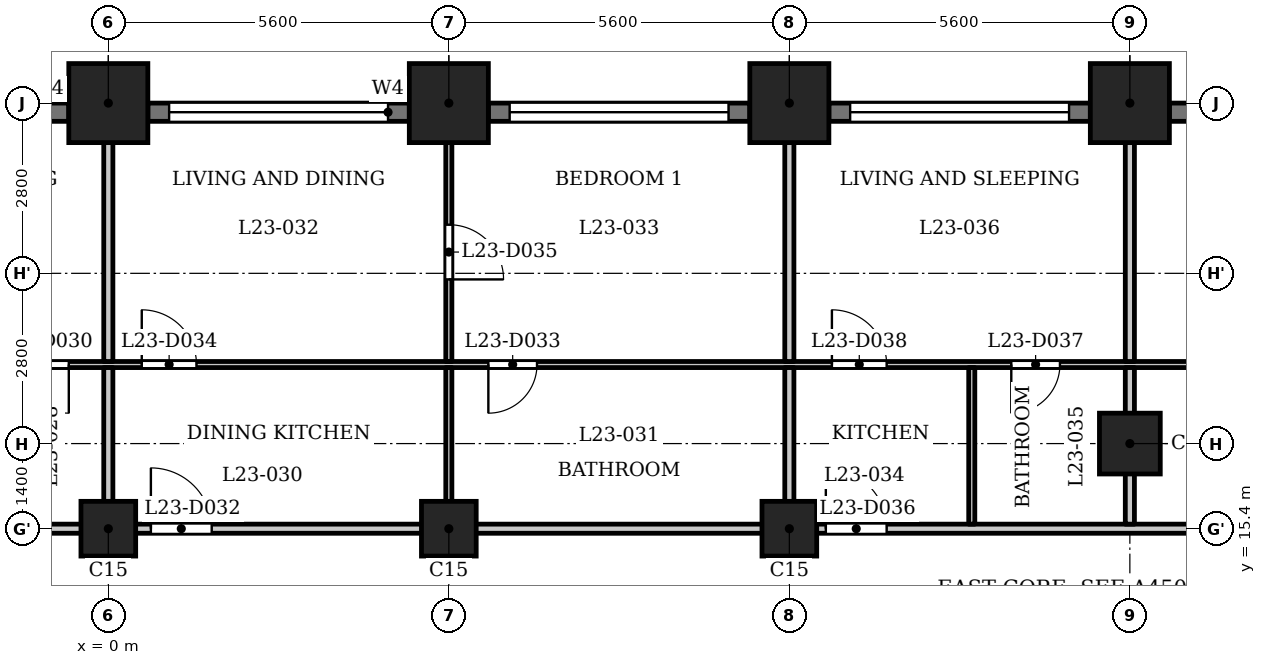
"""IFC4 building model, lengths in metres.
Left out: names, types, materials, properties, quantities, classifications, styles, units other than length and angle.
Written with IfcOpenShell. Run it as: python <this file> out.ifc"""

import sys

from ifc_helpers import new_model, si_unit, direction, frame, frame_2d, origin, origin_2d, place, context, subcontext, project, spatial, rectangle, extrude, element, fill, save


model = new_model("IFC4")
c1 = context("Model", 3, precision=1e-05, world=origin(), true_north=direction((0.0, 1.0)))
c2 = subcontext(c1, "Body", "Model", "MODEL_VIEW")
j1 = project(units=[si_unit("LENGTHUNIT", "METRE"), si_unit("PLANEANGLEUNIT", "RADIAN")], contexts=[c1])
p1 = place(None, origin())
s1 = spatial("IfcSite", under=j1, at=p1, CompositionType="ELEMENT")
p2 = place(p1, origin())
s2 = spatial("IfcBuilding", under=s1, at=p2, CompositionType="ELEMENT")
p3 = place(p2, frame((0.0, 0.0, 93.8)))
s3 = spatial("IfcBuildingStorey", under=s2, at=p3, CompositionType="ELEMENT", Elevation=93.8)
for number, where, z_axis, x_axis in (
    (1, (16.8, 22.4, 0.0), (0.0, 0.0, 1.0), (1.0, 0.0, 0.0)),
    (2, (11.2, 22.4, 0.0), (0.0, 0.0, 1.0), (1.0, 0.0, 0.0)),
    (3, (5.6, 22.4, 0.0), (0.0, 0.0, 1.0), (1.0, 0.0, 0.0)),
    (4, (0.0, 22.4, 0.0), (0.0, 0.0, 1.0), (1.0, 0.0, 0.0)),
):
    element("IfcColumn", number, at=place(p3, frame(where, z_axis=z_axis, x_axis=x_axis)), inside=s3, PredefinedType="COLUMN", context=c2, shape_type="SweptSolid", body=[
        extrude(rectangle(XDim=1.3, YDim=1.3, at=origin_2d()), origin(), (0.0, 0.0, 1.0), 3.5),
    ])
p4 = place(p3, frame((16.8, 16.8, 0.0), z_axis=(0.0, 0.0, 1.0), x_axis=(1.0, 0.0, 0.0)))
e5 = element("IfcColumn", 5, at=p4, inside=s3, PredefinedType="COLUMN", context=c2, shape_type="SweptSolid", body=[
    extrude(rectangle(XDim=1.0, YDim=1.0, at=origin_2d()), origin(), (0.0, 0.0, 1.0), 3.5),
])
for number, where, z_axis, x_axis in (
    (6, (0.0, 15.4, 0.0), (0.0, 0.0, 1.0), (1.0, 0.0, 0.0)),
    (7, (5.6, 15.4, 0.0), (0.0, 0.0, 1.0), (1.0, 0.0, 0.0)),
    (8, (11.2, 15.4, 0.0), (0.0, 0.0, 1.0), (1.0, 0.0, 0.0)),
):
    element("IfcColumn", number, at=place(p3, frame(where, z_axis=z_axis, x_axis=x_axis)), inside=s3, PredefinedType="COLUMN", context=c2, shape_type="SweptSolid", body=[
        extrude(rectangle(XDim=0.9, YDim=0.9, at=origin_2d()), origin(), (0.0, 0.0, 1.0), 3.5),
    ])
p5 = place(p3, frame((20.0, 22.25, 0.0), z_axis=(0.0, 0.0, 1.0), x_axis=(-1.0, 0.0, 0.0)))
e9 = element("IfcWall", 9, at=p5, inside=s3, PredefinedType="SOLIDWALL", context=c2, shape_type="SweptSolid", body=[
    extrude(rectangle(XDim=2.55, YDim=0.3, at=frame_2d((1.275, 0.0))), origin(), (0.0, 0.0, 1.0), 2.4),
])
p6 = place(p5, frame((0.675, 0.0, 0.6)))
e10 = element("IfcOpeningElement", 10, at=p6, cuts=e9, PredefinedType="OPENING", context=c2, shape_type="SweptSolid", body=[
    extrude(rectangle(XDim=1.2, YDim=1.55, at=frame_2d((0.6, 0.775))), frame((0.0, 0.16, 0.0), z_axis=(0.0, -1.0, 0.0), x_axis=(1.0, 0.0, 0.0)), (0.0, 0.0, 1.0), 0.32),
])
p7 = place(p3, frame((16.15, 22.25, 0.0), z_axis=(0.0, 0.0, 1.0), x_axis=(-1.0, 0.0, 0.0)))
e11 = element("IfcWall", 11, at=p7, inside=s3, PredefinedType="SOLIDWALL", context=c2, shape_type="SweptSolid", body=[
    extrude(rectangle(XDim=4.3, YDim=0.3, at=frame_2d((2.15, 0.0))), origin(), (0.0, 0.0, 1.0), 2.4),
])
p8 = place(p7, frame((0.35, 0.0, 1.2)))
e12 = element("IfcOpeningElement", 12, at=p8, cuts=e11, PredefinedType="OPENING", context=c2, shape_type="SweptSolid", body=[
    extrude(rectangle(XDim=3.6, YDim=0.95, at=frame_2d((1.8, 0.475))), frame((0.0, 0.16, 0.0), z_axis=(0.0, -1.0, 0.0), x_axis=(1.0, 0.0, 0.0)), (0.0, 0.0, 1.0), 0.32),
])
p9 = place(p3, frame((10.55, 22.25, 0.0), z_axis=(0.0, 0.0, 1.0), x_axis=(-1.0, 0.0, 0.0)))
e13 = element("IfcWall", 13, at=p9, inside=s3, PredefinedType="SOLIDWALL", context=c2, shape_type="SweptSolid", body=[
    extrude(rectangle(XDim=4.3, YDim=0.3, at=frame_2d((2.15, 0.0))), origin(), (0.0, 0.0, 1.0), 2.4),
])
p10 = place(p9, frame((0.35, 0.0, 1.2)))
e14 = element("IfcOpeningElement", 14, at=p10, cuts=e13, PredefinedType="OPENING", context=c2, shape_type="SweptSolid", body=[
    extrude(rectangle(XDim=3.6, YDim=0.95, at=frame_2d((1.8, 0.475))), frame((0.0, 0.16, 0.0), z_axis=(0.0, -1.0, 0.0), x_axis=(1.0, 0.0, 0.0)), (0.0, 0.0, 1.0), 0.32),
])
p11 = place(p3, frame((4.95, 22.25, 0.0), z_axis=(0.0, 0.0, 1.0), x_axis=(-1.0, 0.0, 0.0)))
e15 = element("IfcWall", 15, at=p11, inside=s3, PredefinedType="SOLIDWALL", context=c2, shape_type="SweptSolid", body=[
    extrude(rectangle(XDim=4.3, YDim=0.3, at=frame_2d((2.15, 0.0))), origin(), (0.0, 0.0, 1.0), 2.4),
])
p12 = place(p11, frame((0.35, 0.0, 1.2)))
e16 = element("IfcOpeningElement", 16, at=p12, cuts=e15, PredefinedType="OPENING", context=c2, shape_type="SweptSolid", body=[
    extrude(rectangle(XDim=3.6, YDim=0.95, at=frame_2d((1.8, 0.475))), frame((0.0, 0.16, 0.0), z_axis=(0.0, -1.0, 0.0), x_axis=(1.0, 0.0, 0.0)), (0.0, 0.0, 1.0), 0.32),
])
p13 = place(p3, frame((-0.65, 22.25, 0.0), z_axis=(0.0, 0.0, 1.0), x_axis=(-1.0, 0.0, 0.0)))
e17 = element("IfcWall", 17, at=p13, inside=s3, PredefinedType="SOLIDWALL", context=c2, shape_type="SweptSolid", body=[
    extrude(rectangle(XDim=4.3, YDim=0.3, at=frame_2d((2.15, 0.0))), origin(), (0.0, 0.0, 1.0), 2.4),
])
p14 = place(p13, frame((0.35, 0.0, 1.2)))
e18 = element("IfcOpeningElement", 18, at=p14, cuts=e17, PredefinedType="OPENING", context=c2, shape_type="SweptSolid", body=[
    extrude(rectangle(XDim=3.6, YDim=0.95, at=frame_2d((1.8, 0.475))), frame((0.0, 0.16, 0.0), z_axis=(0.0, -1.0, 0.0), x_axis=(1.0, 0.0, 0.0)), (0.0, 0.0, 1.0), 0.32),
])
p15 = place(p3, frame((-27.484, 15.4, 0.0), z_axis=(0.0, 0.0, 1.0), x_axis=(1.0, 0.0, 0.0)))
e19 = element("IfcWall", 19, at=p15, inside=s3, PredefinedType="PARTITIONING", context=c2, shape_type="SweptSolid", body=[
    extrude(rectangle(XDim=54.968, YDim=0.15, at=frame_2d((27.484, 0.0))), origin(), (0.0, 0.0, 1.0), 3.2),
])
p16 = place(p15, frame((9.034, 0.0, 0.0)))
e20 = element("IfcOpeningElement", 20, at=p16, cuts=e19, PredefinedType="OPENING", context=c2, shape_type="SweptSolid", body=[
    extrude(rectangle(XDim=1.0, YDim=2.1, at=frame_2d((0.5, 1.05))), frame((0.0, 0.085, 0.0), z_axis=(0.0, -1.0, 0.0), x_axis=(1.0, 0.0, 0.0)), (0.0, 0.0, 1.0), 0.17),
])
p17 = place(p15, frame((14.634, 0.0, 0.0)))
e21 = element("IfcOpeningElement", 21, at=p17, cuts=e19, PredefinedType="OPENING", context=c2, shape_type="SweptSolid", body=[
    extrude(rectangle(XDim=1.0, YDim=2.1, at=frame_2d((0.5, 1.05))), frame((0.0, 0.085, 0.0), z_axis=(0.0, -1.0, 0.0), x_axis=(1.0, 0.0, 0.0)), (0.0, 0.0, 1.0), 0.17),
])
p18 = place(p15, frame((19.984, 0.0, 0.0)))
e22 = element("IfcOpeningElement", 22, at=p18, cuts=e19, PredefinedType="OPENING", context=c2, shape_type="SweptSolid", body=[
    extrude(rectangle(XDim=1.0, YDim=2.1, at=frame_2d((0.5, 1.05))), frame((0.0, 0.085, 0.0), z_axis=(0.0, -1.0, 0.0), x_axis=(1.0, 0.0, 0.0)), (0.0, 0.0, 1.0), 0.17),
])
p19 = place(p15, frame((23.234, 0.0, 0.0)))
e23 = element("IfcOpeningElement", 23, at=p19, cuts=e19, PredefinedType="OPENING", context=c2, shape_type="SweptSolid", body=[
    extrude(rectangle(XDim=1.0, YDim=2.1, at=frame_2d((0.5, 1.05))), frame((0.0, 0.085, 0.0), z_axis=(0.0, -1.0, 0.0), x_axis=(1.0, 0.0, 0.0)), (0.0, 0.0, 1.0), 0.17),
])
p20 = place(p15, frame((28.184, 0.0, 0.0)))
e24 = element("IfcOpeningElement", 24, at=p20, cuts=e19, PredefinedType="OPENING", context=c2, shape_type="SweptSolid", body=[
    extrude(rectangle(XDim=1.0, YDim=2.1, at=frame_2d((0.5, 1.05))), frame((0.0, 0.085, 0.0), z_axis=(0.0, -1.0, 0.0), x_axis=(1.0, 0.0, 0.0)), (0.0, 0.0, 1.0), 0.17),
])
p21 = place(p15, frame((39.284, 0.0, 0.0)))
e25 = element("IfcOpeningElement", 25, at=p21, cuts=e19, PredefinedType="OPENING", context=c2, shape_type="SweptSolid", body=[
    extrude(rectangle(XDim=1.0, YDim=2.1, at=frame_2d((0.5, 1.05))), frame((0.0, 0.085, 0.0), z_axis=(0.0, -1.0, 0.0), x_axis=(1.0, 0.0, 0.0)), (0.0, 0.0, 1.0), 0.17),
])
p22 = place(p15, frame((48.234, 0.0, 0.0)))
e26 = element("IfcOpeningElement", 26, at=p22, cuts=e19, PredefinedType="OPENING", context=c2, shape_type="SweptSolid", body=[
    extrude(rectangle(XDim=1.0, YDim=2.1, at=frame_2d((0.5, 1.05))), frame((0.0, 0.085, 0.0), z_axis=(0.0, -1.0, 0.0), x_axis=(1.0, 0.0, 0.0)), (0.0, 0.0, 1.0), 0.17),
])
p23 = place(p3, frame((-26.44, 18.1, 0.0), z_axis=(0.0, 0.0, 1.0), x_axis=(1.0, 0.0, 0.0)))
e27 = element("IfcWall", 27, at=p23, inside=s3, PredefinedType="PARTITIONING", context=c2, shape_type="SweptSolid", body=[
    extrude(rectangle(XDim=52.63, YDim=0.1, at=frame_2d((26.315, 0.0))), origin(), (0.0, 0.0, 1.0), 3.2),
])
p24 = place(p23, frame((2.626, 0.0, 0.0)))
e28 = element("IfcOpeningElement", 28, at=p24, cuts=e27, PredefinedType="OPENING", context=c2, shape_type="SweptSolid", body=[
    extrude(rectangle(XDim=0.8, YDim=2.1, at=frame_2d((0.4, 1.05))), frame((0.0, 0.06, 0.0), z_axis=(0.0, -1.0, 0.0), x_axis=(1.0, 0.0, 0.0)), (0.0, 0.0, 1.0), 0.12),
])
p25 = place(p23, frame((8.09, 0.0, 0.0)))
e29 = element("IfcOpeningElement", 29, at=p25, cuts=e27, PredefinedType="OPENING", context=c2, shape_type="SweptSolid", body=[
    extrude(rectangle(XDim=0.9, YDim=2.1, at=frame_2d((0.45, 1.05))), frame((0.0, 0.06, 0.0), z_axis=(0.0, -1.0, 0.0), x_axis=(1.0, 0.0, 0.0)), (0.0, 0.0, 1.0), 0.12),
])
p26 = place(p23, frame((10.29, 0.0, 0.0)))
e30 = element("IfcOpeningElement", 30, at=p26, cuts=e27, PredefinedType="OPENING", context=c2, shape_type="SweptSolid", body=[
    extrude(rectangle(XDim=0.8, YDim=2.1, at=frame_2d((0.4, 1.05))), frame((0.0, 0.06, 0.0), z_axis=(0.0, -1.0, 0.0), x_axis=(1.0, 0.0, 0.0)), (0.0, 0.0, 1.0), 0.12),
])
p27 = place(p23, frame((13.69, 0.0, 0.0)))
e31 = element("IfcOpeningElement", 31, at=p27, cuts=e27, PredefinedType="OPENING", context=c2, shape_type="SweptSolid", body=[
    extrude(rectangle(XDim=0.9, YDim=2.1, at=frame_2d((0.45, 1.05))), frame((0.0, 0.06, 0.0), z_axis=(0.0, -1.0, 0.0), x_axis=(1.0, 0.0, 0.0)), (0.0, 0.0, 1.0), 0.12),
])
p28 = place(p23, frame((15.89, 0.0, 0.0)))
e32 = element("IfcOpeningElement", 32, at=p28, cuts=e27, PredefinedType="OPENING", context=c2, shape_type="SweptSolid", body=[
    extrude(rectangle(XDim=0.8, YDim=2.1, at=frame_2d((0.4, 1.05))), frame((0.0, 0.06, 0.0), z_axis=(0.0, -1.0, 0.0), x_axis=(1.0, 0.0, 0.0)), (0.0, 0.0, 1.0), 0.12),
])
p29 = place(p23, frame((19.04, 0.0, 0.0)))
e33 = element("IfcOpeningElement", 33, at=p29, cuts=e27, PredefinedType="OPENING", context=c2, shape_type="SweptSolid", body=[
    extrude(rectangle(XDim=0.9, YDim=2.1, at=frame_2d((0.45, 1.05))), frame((0.0, 0.06, 0.0), z_axis=(0.0, -1.0, 0.0), x_axis=(1.0, 0.0, 0.0)), (0.0, 0.0, 1.0), 0.12),
])
p30 = place(p23, frame((24.99, 0.0, 0.0)))
e34 = element("IfcOpeningElement", 34, at=p30, cuts=e27, PredefinedType="OPENING", context=c2, shape_type="SweptSolid", body=[
    extrude(rectangle(XDim=0.8, YDim=2.1, at=frame_2d((0.4, 1.05))), frame((0.0, 0.06, 0.0), z_axis=(0.0, -1.0, 0.0), x_axis=(1.0, 0.0, 0.0)), (0.0, 0.0, 1.0), 0.12),
])
p31 = place(p23, frame((22.29, 0.0, 0.0)))
e35 = element("IfcOpeningElement", 35, at=p31, cuts=e27, PredefinedType="OPENING", context=c2, shape_type="SweptSolid", body=[
    extrude(rectangle(XDim=0.9, YDim=2.1, at=frame_2d((0.45, 1.05))), frame((0.0, 0.06, 0.0), z_axis=(0.0, -1.0, 0.0), x_axis=(1.0, 0.0, 0.0)), (0.0, 0.0, 1.0), 0.12),
])
p32 = place(p23, frame((32.69, 0.0, 0.0)))
e36 = element("IfcOpeningElement", 36, at=p32, cuts=e27, PredefinedType="OPENING", context=c2, shape_type="SweptSolid", body=[
    extrude(rectangle(XDim=0.8, YDim=2.1, at=frame_2d((0.4, 1.05))), frame((0.0, 0.06, 0.0), z_axis=(0.0, -1.0, 0.0), x_axis=(1.0, 0.0, 0.0)), (0.0, 0.0, 1.0), 0.12),
])
p33 = place(p23, frame((26.99, 0.0, 0.0)))
e37 = element("IfcOpeningElement", 37, at=p33, cuts=e27, PredefinedType="OPENING", context=c2, shape_type="SweptSolid", body=[
    extrude(rectangle(XDim=0.9, YDim=2.1, at=frame_2d((0.45, 1.05))), frame((0.0, 0.06, 0.0), z_axis=(0.0, -1.0, 0.0), x_axis=(1.0, 0.0, 0.0)), (0.0, 0.0, 1.0), 0.12),
])
p34 = place(p23, frame((41.29, 0.0, 0.0)))
e38 = element("IfcOpeningElement", 38, at=p34, cuts=e27, PredefinedType="OPENING", context=c2, shape_type="SweptSolid", body=[
    extrude(rectangle(XDim=0.8, YDim=2.1, at=frame_2d((0.4, 1.05))), frame((0.0, 0.06, 0.0), z_axis=(0.0, -1.0, 0.0), x_axis=(1.0, 0.0, 0.0)), (0.0, 0.0, 1.0), 0.12),
])
p35 = place(p23, frame((38.34, 0.0, 0.0)))
e39 = element("IfcOpeningElement", 39, at=p35, cuts=e27, PredefinedType="OPENING", context=c2, shape_type="SweptSolid", body=[
    extrude(rectangle(XDim=0.9, YDim=2.1, at=frame_2d((0.45, 1.05))), frame((0.0, 0.06, 0.0), z_axis=(0.0, -1.0, 0.0), x_axis=(1.0, 0.0, 0.0)), (0.0, 0.0, 1.0), 0.12),
])
p36 = place(p23, frame((50.74, 0.0, 0.0)))
e40 = element("IfcOpeningElement", 40, at=p36, cuts=e27, PredefinedType="OPENING", context=c2, shape_type="SweptSolid", body=[
    extrude(rectangle(XDim=0.8, YDim=2.1, at=frame_2d((0.4, 1.05))), frame((0.0, 0.06, 0.0), z_axis=(0.0, -1.0, 0.0), x_axis=(1.0, 0.0, 0.0)), (0.0, 0.0, 1.0), 0.12),
])
p37 = place(p23, frame((47.29, 0.0, 0.0)))
e41 = element("IfcOpeningElement", 41, at=p37, cuts=e27, PredefinedType="OPENING", context=c2, shape_type="SweptSolid", body=[
    extrude(rectangle(XDim=0.9, YDim=2.1, at=frame_2d((0.45, 1.05))), frame((0.0, 0.06, 0.0), z_axis=(0.0, -1.0, 0.0), x_axis=(1.0, 0.0, 0.0)), (0.0, 0.0, 1.0), 0.12),
])
p38 = place(p3, frame((0.0, 15.475, 0.0), z_axis=(0.0, 0.0, 1.0), x_axis=(0.0, 1.0, 0.0)))
e42 = element("IfcWall", 42, at=p38, inside=s3, PredefinedType="PARTITIONING", context=c2, shape_type="SweptSolid", body=[
    extrude(rectangle(XDim=2.575, YDim=0.15, at=frame_2d((1.288, 0.0))), origin(), (0.0, 0.0, 1.0), 3.2),
])
p39 = place(p3, frame((0.0, 18.15, 0.0), z_axis=(0.0, 0.0, 1.0), x_axis=(0.0, 1.0, 0.0)))
e43 = element("IfcWall", 43, at=p39, inside=s3, PredefinedType="PARTITIONING", context=c2, shape_type="SweptSolid", body=[
    extrude(rectangle(XDim=4.88, YDim=0.15, at=frame_2d((2.44, 0.0))), origin(), (0.0, 0.0, 1.0), 3.2),
])
p40 = place(p3, frame((5.6, 15.475, 0.0), z_axis=(0.0, 0.0, 1.0), x_axis=(0.0, 1.0, 0.0)))
e44 = element("IfcWall", 44, at=p40, inside=s3, PredefinedType="PARTITIONING", context=c2, shape_type="SweptSolid", body=[
    extrude(rectangle(XDim=2.575, YDim=0.1, at=frame_2d((1.288, 0.0))), origin(), (0.0, 0.0, 1.0), 3.2),
])
p41 = place(p3, frame((5.6, 18.15, 0.0), z_axis=(0.0, 0.0, 1.0), x_axis=(0.0, 1.0, 0.0)))
e45 = element("IfcWall", 45, at=p41, inside=s3, PredefinedType="PARTITIONING", context=c2, shape_type="SweptSolid", body=[
    extrude(rectangle(XDim=4.88, YDim=0.1, at=frame_2d((2.44, 0.0))), origin(), (0.0, 0.0, 1.0), 3.2),
])
p42 = place(p41, frame((1.35, 0.0, 0.0)))
e46 = element("IfcOpeningElement", 46, at=p42, cuts=e45, PredefinedType="OPENING", context=c2, shape_type="SweptSolid", body=[
    extrude(rectangle(XDim=0.9, YDim=2.1, at=frame_2d((0.45, 1.05))), frame((0.0, 0.06, 0.0), z_axis=(0.0, -1.0, 0.0), x_axis=(1.0, 0.0, 0.0)), (0.0, 0.0, 1.0), 0.12),
])
p43 = place(p3, frame((11.2, 15.475, 0.0), z_axis=(0.0, 0.0, 1.0), x_axis=(0.0, 1.0, 0.0)))
e47 = element("IfcWall", 47, at=p43, inside=s3, PredefinedType="PARTITIONING", context=c2, shape_type="SweptSolid", body=[
    extrude(rectangle(XDim=2.575, YDim=0.15, at=frame_2d((1.288, 0.0))), origin(), (0.0, 0.0, 1.0), 3.2),
])
p44 = place(p3, frame((11.2, 18.15, 0.0), z_axis=(0.0, 0.0, 1.0), x_axis=(0.0, 1.0, 0.0)))
e48 = element("IfcWall", 48, at=p44, inside=s3, PredefinedType="PARTITIONING", context=c2, shape_type="SweptSolid", body=[
    extrude(rectangle(XDim=4.88, YDim=0.15, at=frame_2d((2.44, 0.0))), origin(), (0.0, 0.0, 1.0), 3.2),
])
p45 = place(p3, frame((14.2, 15.475, 0.0), z_axis=(0.0, 0.0, 1.0), x_axis=(0.0, 1.0, 0.0)))
e49 = element("IfcWall", 49, at=p45, inside=s3, PredefinedType="PARTITIONING", context=c2, shape_type="SweptSolid", body=[
    extrude(rectangle(XDim=2.575, YDim=0.1, at=frame_2d((1.288, 0.0))), origin(), (0.0, 0.0, 1.0), 3.2),
])
p46 = place(p3, frame((16.8, 15.475, 0.0), z_axis=(0.0, 0.0, 1.0), x_axis=(0.0, 1.0, 0.0)))
e50 = element("IfcWall", 50, at=p46, inside=s3, PredefinedType="PARTITIONING", context=c2, shape_type="SweptSolid", body=[
    extrude(rectangle(XDim=2.575, YDim=0.15, at=frame_2d((1.288, 0.0))), origin(), (0.0, 0.0, 1.0), 3.2),
])
p47 = place(p3, frame((16.8, 18.15, 0.0), z_axis=(0.0, 0.0, 1.0), x_axis=(0.0, 1.0, 0.0)))
e51 = element("IfcWall", 51, at=p47, inside=s3, PredefinedType="PARTITIONING", context=c2, shape_type="SweptSolid", body=[
    extrude(rectangle(XDim=4.88, YDim=0.15, at=frame_2d((2.44, 0.0))), origin(), (0.0, 0.0, 1.0), 3.2),
])
p48 = place(p30, origin())
e52 = element("IfcDoor", 52, at=p48, inside=s3, OperationType="SINGLE_SWING_RIGHT", PredefinedType="DOOR", context=c2, shape_type="SweptSolid", body=[
    extrude(rectangle(XDim=0.8, YDim=2.1, at=frame_2d((0.4, 1.05))), frame((0.0, 0.025, 0.0), z_axis=(0.0, -1.0, 0.0), x_axis=(1.0, 0.0, 0.0)), (0.0, 0.0, 1.0), 0.05),
])
fill(e34, e52)
p49 = place(p20, origin())
e53 = element("IfcDoor", 53, at=p49, inside=s3, OperationType="SINGLE_SWING_RIGHT", PredefinedType="DOOR", context=c2, shape_type="SweptSolid", body=[
    extrude(rectangle(XDim=1.0, YDim=2.1, at=frame_2d((0.5, 1.05))), frame((0.0, 0.025, 0.0), z_axis=(0.0, -1.0, 0.0), x_axis=(1.0, 0.0, 0.0)), (0.0, 0.0, 1.0), 0.05),
])
fill(e24, e53)
p50 = place(p32, origin())
e54 = element("IfcDoor", 54, at=p50, inside=s3, OperationType="SINGLE_SWING_LEFT", PredefinedType="DOOR", context=c2, shape_type="SweptSolid", body=[
    extrude(rectangle(XDim=0.8, YDim=2.1, at=frame_2d((0.4, 1.05))), frame((0.0, 0.025, 0.0), z_axis=(0.0, -1.0, 0.0), x_axis=(1.0, 0.0, 0.0)), (0.0, 0.0, 1.0), 0.05),
])
fill(e36, e54)
p51 = place(p33, origin())
e55 = element("IfcDoor", 55, at=p51, inside=s3, OperationType="SINGLE_SWING_RIGHT", PredefinedType="DOOR", context=c2, shape_type="SweptSolid", body=[
    extrude(rectangle(XDim=0.9, YDim=2.1, at=frame_2d((0.45, 1.05))), frame((0.0, 0.025, 0.0), z_axis=(0.0, -1.0, 0.0), x_axis=(1.0, 0.0, 0.0)), (0.0, 0.0, 1.0), 0.05),
])
fill(e37, e55)
p52 = place(p42, origin())
e56 = element("IfcDoor", 56, at=p52, inside=s3, OperationType="SINGLE_SWING_LEFT", PredefinedType="DOOR", context=c2, shape_type="SweptSolid", body=[
    extrude(rectangle(XDim=0.9, YDim=2.1, at=frame_2d((0.45, 1.05))), frame((0.0, 0.025, 0.0), z_axis=(0.0, -1.0, 0.0), x_axis=(1.0, 0.0, 0.0)), (0.0, 0.0, 1.0), 0.05),
])
fill(e46, e56)
p53 = place(p21, origin())
e57 = element("IfcDoor", 57, at=p53, inside=s3, OperationType="SINGLE_SWING_RIGHT", PredefinedType="DOOR", context=c2, shape_type="SweptSolid", body=[
    extrude(rectangle(XDim=1.0, YDim=2.1, at=frame_2d((0.5, 1.05))), frame((0.0, 0.025, 0.0), z_axis=(0.0, -1.0, 0.0), x_axis=(1.0, 0.0, 0.0)), (0.0, 0.0, 1.0), 0.05),
])
fill(e25, e57)
p54 = place(p34, origin())
e58 = element("IfcDoor", 58, at=p54, inside=s3, OperationType="SINGLE_SWING_LEFT", PredefinedType="DOOR", context=c2, shape_type="SweptSolid", body=[
    extrude(rectangle(XDim=0.8, YDim=2.1, at=frame_2d((0.4, 1.05))), frame((0.0, 0.025, 0.0), z_axis=(0.0, -1.0, 0.0), x_axis=(1.0, 0.0, 0.0)), (0.0, 0.0, 1.0), 0.05),
])
fill(e38, e58)
p55 = place(p35, origin())
e59 = element("IfcDoor", 59, at=p55, inside=s3, OperationType="SINGLE_SWING_RIGHT", PredefinedType="DOOR", context=c2, shape_type="SweptSolid", body=[
    extrude(rectangle(XDim=0.9, YDim=2.1, at=frame_2d((0.45, 1.05))), frame((0.0, 0.025, 0.0), z_axis=(0.0, -1.0, 0.0), x_axis=(1.0, 0.0, 0.0)), (0.0, 0.0, 1.0), 0.05),
])
fill(e39, e59)
p56 = place(p8, origin())
e60 = element("IfcWindow", 60, at=p56, inside=s3, PartitioningType="SINGLE_PANEL", PredefinedType="WINDOW", context=c2, shape_type="SweptSolid", body=[
    extrude(rectangle(XDim=3.6, YDim=0.95, at=frame_2d((1.8, 0.475))), frame((0.0, 0.03, 0.0), z_axis=(0.0, -1.0, 0.0), x_axis=(1.0, 0.0, 0.0)), (0.0, 0.0, 1.0), 0.06),
])
fill(e12, e60)
p57 = place(p10, origin())
e61 = element("IfcWindow", 61, at=p57, inside=s3, PartitioningType="SINGLE_PANEL", PredefinedType="WINDOW", context=c2, shape_type="SweptSolid", body=[
    extrude(rectangle(XDim=3.6, YDim=0.95, at=frame_2d((1.8, 0.475))), frame((0.0, 0.03, 0.0), z_axis=(0.0, -1.0, 0.0), x_axis=(1.0, 0.0, 0.0)), (0.0, 0.0, 1.0), 0.06),
])
fill(e14, e61)
p58 = place(p12, origin())
e62 = element("IfcWindow", 62, at=p58, inside=s3, PartitioningType="SINGLE_PANEL", PredefinedType="WINDOW", context=c2, shape_type="SweptSolid", body=[
    extrude(rectangle(XDim=3.6, YDim=0.95, at=frame_2d((1.8, 0.475))), frame((0.0, 0.03, 0.0), z_axis=(0.0, -1.0, 0.0), x_axis=(1.0, 0.0, 0.0)), (0.0, 0.0, 1.0), 0.06),
])
fill(e16, e62)
save(model, sys.argv[1])
